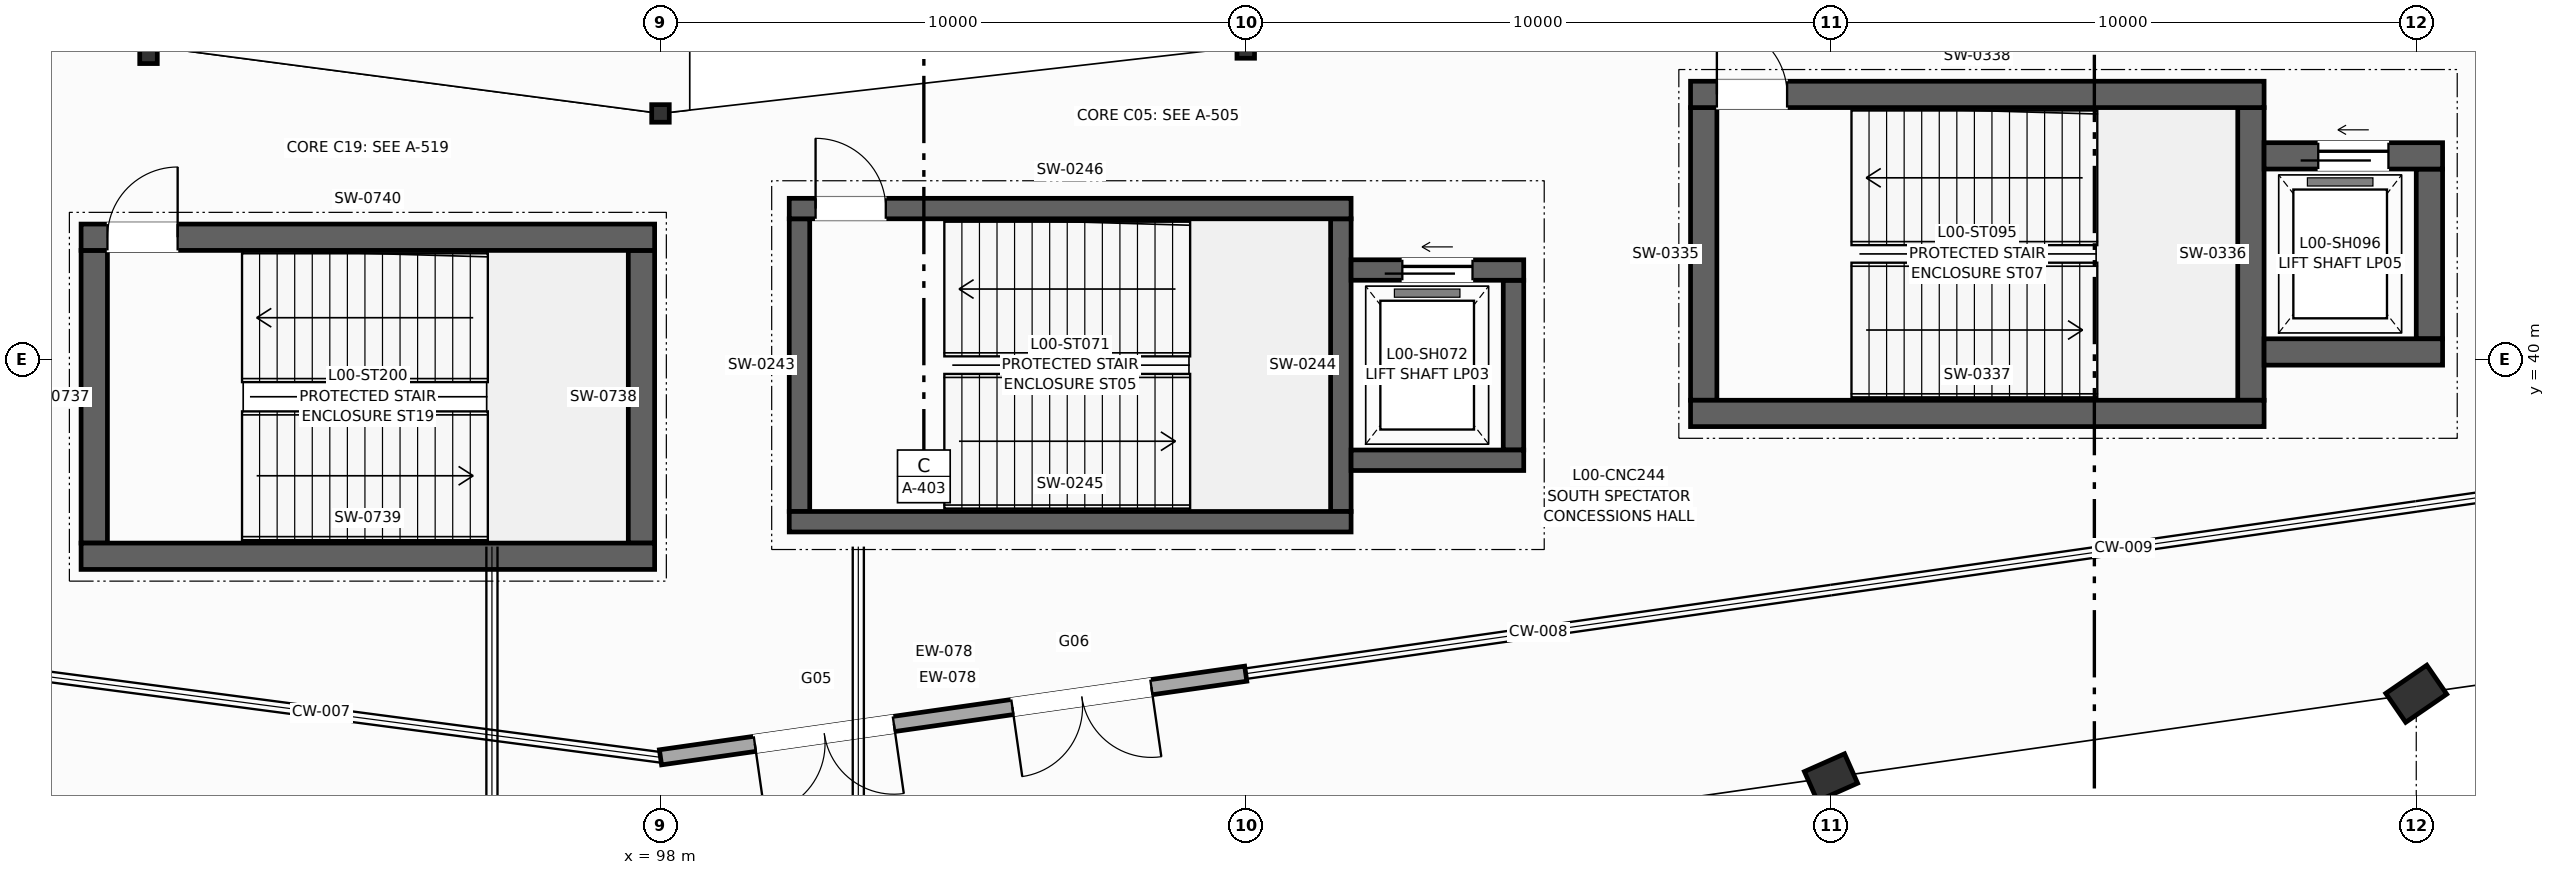
"""IFC4 building model, lengths in metres.
Left out: names, types, materials, properties, quantities, classifications, styles, units other than length and angle.
Written with IfcOpenShell. Run it as: python <this file> out.ifc"""

import sys

from ifc_helpers import new_model, si_unit, direction, frame, frame_2d, origin, origin_2d, place, context, subcontext, project, spatial, rectangle, i_section, extrude, element, fill, save


model = new_model("IFC4")
c1 = context("Model", 3, precision=1e-05, world=origin(), true_north=direction((0.0, 1.0)))
c2 = subcontext(c1, "Body", "Model", "MODEL_VIEW")
j1 = project(units=[si_unit("LENGTHUNIT", "METRE"), si_unit("PLANEANGLEUNIT", "RADIAN")], contexts=[c1])
p1 = place(None, origin())
s1 = spatial("IfcSite", under=j1, at=p1, CompositionType="ELEMENT")
p2 = place(p1, origin())
s2 = spatial("IfcBuilding", under=s1, at=p2, CompositionType="ELEMENT")
p3 = place(p2, origin())
s3 = spatial("IfcBuildingStorey", under=s2, at=p3, CompositionType="ELEMENT", Elevation=0.0)
p4 = place(p3, frame((89.252, 45.352, 0.0), z_axis=(0.0, 0.0, 1.0), x_axis=(1.0, 0.0, 0.0)))
e1 = element("IfcColumn", 1, at=p4, inside=s3, PredefinedType="COLUMN", context=c2, shape_type="SweptSolid", body=[
    extrude(i_section(OverallWidth=0.3, OverallDepth=0.6, WebThickness=0.015, FlangeThickness=0.03, at=origin_2d()), origin(), (0.0, 0.0, 1.0), 4.5),
])
p5 = place(p3, frame((98.0, 44.2, 0.0), z_axis=(0.0, 0.0, 1.0), x_axis=(1.0, 0.0, 0.0)))
e2 = element("IfcColumn", 2, at=p5, inside=s3, PredefinedType="COLUMN", context=c2, shape_type="SweptSolid", body=[
    extrude(i_section(OverallWidth=0.3, OverallDepth=0.3, WebThickness=0.011, FlangeThickness=0.019, at=origin_2d()), origin(), (0.0, 0.0, 1.0), 4.5),
])
p6 = place(p3, frame((108.0, 45.343, 0.0), z_axis=(0.0, 0.0, 1.0), x_axis=(1.0, 0.0, 0.0)))
e3 = element("IfcColumn", 3, at=p6, inside=s3, PredefinedType="COLUMN", context=c2, shape_type="SweptSolid", body=[
    extrude(i_section(OverallWidth=0.3, OverallDepth=0.4, WebThickness=0.013, FlangeThickness=0.024, at=origin_2d()), origin(), (0.0, 0.0, 1.0), 4.5),
])
p7 = place(p3, frame((118.0, 32.857, 0.0), z_axis=(0.0, 0.0, 1.0), x_axis=(-0.40514158678, 0.914253955234, 0.0)))
e4 = element("IfcColumn", 4, at=p7, inside=s3, PredefinedType="PILASTER", context=c2, shape_type="SweptSolid", body=[
    extrude(rectangle(XDim=0.75, YDim=0.55, at=origin_2d()), origin(), (0.0, 0.0, 1.0), 4.5),
])
p8 = place(p3, frame((128.0, 34.286, 0.0), z_axis=(0.0, 0.0, 1.0), x_axis=(-0.566406236925, 0.824126188622, 0.0)))
e5 = element("IfcColumn", 5, at=p8, inside=s3, PredefinedType="PILASTER", context=c2, shape_type="SweptSolid", body=[
    extrude(rectangle(XDim=0.85, YDim=0.6, at=origin_2d()), origin(), (0.0, 0.0, 1.0), 4.5),
])
p9 = place(p3, frame((98.0, 33.2, 0.0), z_axis=(0.0, 0.0, 1.0), x_axis=(0.989944175879, 0.141458575718, 0.0)))
e6 = element("IfcWall", 6, at=p9, inside=s3, PredefinedType="SOLIDWALL", context=c2, shape_type="SweptSolid", body=[
    extrude(rectangle(XDim=10.102, YDim=0.26, at=frame_2d((5.051, 0.0))), origin(), (0.0, 0.0, 1.0), 3.68),
])
p10 = place(p9, frame((1.628, 0.0, 0.0)))
e7 = element("IfcOpeningElement", 7, at=p10, cuts=e6, PredefinedType="OPENING", context=c2, shape_type="SweptSolid", body=[
    extrude(rectangle(XDim=2.4, YDim=2.5, at=frame_2d((1.2, 1.25))), frame((0.0, 0.14, 0.0), z_axis=(0.0, -1.0, 0.0), x_axis=(1.0, 0.0, 0.0)), (0.0, 0.0, 1.0), 0.28),
])
p11 = place(p9, frame((6.073, 0.0, 0.0)))
e8 = element("IfcOpeningElement", 8, at=p11, cuts=e6, PredefinedType="OPENING", context=c2, shape_type="SweptSolid", body=[
    extrude(rectangle(XDim=2.4, YDim=2.5, at=frame_2d((1.2, 1.25))), frame((0.0, 0.14, 0.0), z_axis=(0.0, -1.0, 0.0), x_axis=(1.0, 0.0, 0.0)), (0.0, 0.0, 1.0), 0.28),
])
for number, where, z_axis, x_axis in (
    (9, (100.375, 37.4, 0.0), (0.0, 0.0, 1.0), (0.0, 1.0, 0.0)),
    (10, (109.625, 37.4, 0.0), (0.0, 0.0, 1.0), (0.0, 1.0, 0.0)),
):
    element("IfcWall", number, at=place(p3, frame(where, z_axis=z_axis, x_axis=x_axis)), inside=s3, PredefinedType="SHEAR", context=c2, shape_type="SweptSolid", body=[
        extrude(rectangle(XDim=5.0, YDim=0.35, at=frame_2d((2.5, 0.0))), origin(), (0.0, 0.0, 1.0), 4.225),
    ])
p12 = place(p3, frame((100.2, 37.225, 0.0), z_axis=(0.0, 0.0, 1.0), x_axis=(1.0, 0.0, 0.0)))
e11 = element("IfcWall", 11, at=p12, inside=s3, PredefinedType="SHEAR", context=c2, shape_type="SweptSolid", body=[
    extrude(rectangle(XDim=9.6, YDim=0.35, at=frame_2d((4.8, 0.0))), origin(), (0.0, 0.0, 1.0), 4.225),
])
p13 = place(p3, frame((100.2, 42.575, 0.0), z_axis=(0.0, 0.0, 1.0), x_axis=(1.0, 0.0, 0.0)))
e12 = element("IfcWall", 12, at=p13, inside=s3, PredefinedType="SHEAR", context=c2, shape_type="SweptSolid", body=[
    extrude(rectangle(XDim=9.6, YDim=0.35, at=frame_2d((4.8, 0.0))), origin(), (0.0, 0.0, 1.0), 4.225),
])
p14 = place(p13, frame((0.45, 0.0, 0.0)))
e13 = element("IfcOpeningElement", 13, at=p14, cuts=e12, PredefinedType="OPENING", context=c2, shape_type="SweptSolid", body=[
    extrude(rectangle(XDim=1.2, YDim=2.2, at=frame_2d((0.6, 1.1))), frame((0.0, 0.185, 0.0), z_axis=(0.0, -1.0, 0.0), x_axis=(1.0, 0.0, 0.0)), (0.0, 0.0, 1.0), 0.37),
])
p15 = place(p3, frame((112.575, 38.45, 0.0), z_axis=(0.0, 0.0, 1.0), x_axis=(0.0, 1.0, 0.0)))
e14 = element("IfcWall", 14, at=p15, inside=s3, PredefinedType="SHEAR", context=c2, shape_type="SweptSolid", body=[
    extrude(rectangle(XDim=2.9, YDim=0.35, at=frame_2d((1.45, 0.0))), origin(), (0.0, 0.0, 1.0), 4.225),
])
p16 = place(p3, frame((109.8, 38.275, 0.0), z_axis=(0.0, 0.0, 1.0), x_axis=(1.0, 0.0, 0.0)))
e15 = element("IfcWall", 15, at=p16, inside=s3, PredefinedType="SHEAR", context=c2, shape_type="SweptSolid", body=[
    extrude(rectangle(XDim=2.95, YDim=0.35, at=frame_2d((1.475, 0.0))), origin(), (0.0, 0.0, 1.0), 4.225),
])
p17 = place(p3, frame((109.8, 41.525, 0.0), z_axis=(0.0, 0.0, 1.0), x_axis=(1.0, 0.0, 0.0)))
e16 = element("IfcWall", 16, at=p17, inside=s3, PredefinedType="SHEAR", context=c2, shape_type="SweptSolid", body=[
    extrude(rectangle(XDim=2.95, YDim=0.35, at=frame_2d((1.475, 0.0))), origin(), (0.0, 0.0, 1.0), 4.225),
])
p18 = place(p17, frame((0.875, 0.0, 0.0)))
e17 = element("IfcOpeningElement", 17, at=p18, cuts=e16, PredefinedType="OPENING", context=c2, shape_type="SweptSolid", body=[
    extrude(rectangle(XDim=1.2, YDim=2.2, at=frame_2d((0.6, 1.1))), frame((0.0, 0.185, 0.0), z_axis=(0.0, -1.0, 0.0), x_axis=(1.0, 0.0, 0.0)), (0.0, 0.0, 1.0), 0.37),
])
for number, where, z_axis, x_axis in (
    (18, (115.825, 39.3, 0.0), (0.0, 0.0, 1.0), (0.0, 1.0, 0.0)),
    (19, (125.175, 39.3, 0.0), (0.0, 0.0, 1.0), (0.0, 1.0, 0.0)),
):
    element("IfcWall", number, at=place(p3, frame(where, z_axis=z_axis, x_axis=x_axis)), inside=s3, PredefinedType="SHEAR", context=c2, shape_type="SweptSolid", body=[
        extrude(rectangle(XDim=5.0, YDim=0.45, at=frame_2d((2.5, 0.0))), origin(), (0.0, 0.0, 1.0), 4.225),
    ])
p19 = place(p3, frame((115.6, 39.075, 0.0), z_axis=(0.0, 0.0, 1.0), x_axis=(1.0, 0.0, 0.0)))
e20 = element("IfcWall", 20, at=p19, inside=s3, PredefinedType="SHEAR", context=c2, shape_type="SweptSolid", body=[
    extrude(rectangle(XDim=9.8, YDim=0.45, at=frame_2d((4.9, 0.0))), origin(), (0.0, 0.0, 1.0), 4.225),
])
p20 = place(p3, frame((115.6, 44.525, 0.0), z_axis=(0.0, 0.0, 1.0), x_axis=(1.0, 0.0, 0.0)))
e21 = element("IfcWall", 21, at=p20, inside=s3, PredefinedType="SHEAR", context=c2, shape_type="SweptSolid", body=[
    extrude(rectangle(XDim=9.8, YDim=0.45, at=frame_2d((4.9, 0.0))), origin(), (0.0, 0.0, 1.0), 4.225),
])
p21 = place(p20, frame((0.45, 0.0, 0.0)))
e22 = element("IfcOpeningElement", 22, at=p21, cuts=e21, PredefinedType="OPENING", context=c2, shape_type="SweptSolid", body=[
    extrude(rectangle(XDim=1.2, YDim=2.2, at=frame_2d((0.6, 1.1))), frame((0.0, 0.235, 0.0), z_axis=(0.0, -1.0, 0.0), x_axis=(1.0, 0.0, 0.0)), (0.0, 0.0, 1.0), 0.47),
])
p22 = place(p3, frame((128.225, 40.35, 0.0), z_axis=(0.0, 0.0, 1.0), x_axis=(0.0, 1.0, 0.0)))
e23 = element("IfcWall", 23, at=p22, inside=s3, PredefinedType="SHEAR", context=c2, shape_type="SweptSolid", body=[
    extrude(rectangle(XDim=2.9, YDim=0.45, at=frame_2d((1.45, 0.0))), origin(), (0.0, 0.0, 1.0), 4.225),
])
p23 = place(p3, frame((125.4, 40.125, 0.0), z_axis=(0.0, 0.0, 1.0), x_axis=(1.0, 0.0, 0.0)))
e24 = element("IfcWall", 24, at=p23, inside=s3, PredefinedType="SHEAR", context=c2, shape_type="SweptSolid", body=[
    extrude(rectangle(XDim=3.05, YDim=0.45, at=frame_2d((1.525, 0.0))), origin(), (0.0, 0.0, 1.0), 4.225),
])
p24 = place(p3, frame((125.4, 43.475, 0.0), z_axis=(0.0, 0.0, 1.0), x_axis=(1.0, 0.0, 0.0)))
e25 = element("IfcWall", 25, at=p24, inside=s3, PredefinedType="SHEAR", context=c2, shape_type="SweptSolid", body=[
    extrude(rectangle(XDim=3.05, YDim=0.45, at=frame_2d((1.525, 0.0))), origin(), (0.0, 0.0, 1.0), 4.225),
])
p25 = place(p24, frame((0.925, 0.0, 0.0)))
e26 = element("IfcOpeningElement", 26, at=p25, cuts=e25, PredefinedType="OPENING", context=c2, shape_type="SweptSolid", body=[
    extrude(rectangle(XDim=1.2, YDim=2.2, at=frame_2d((0.6, 1.1))), frame((0.0, 0.235, 0.0), z_axis=(0.0, -1.0, 0.0), x_axis=(1.0, 0.0, 0.0)), (0.0, 0.0, 1.0), 0.47),
])
for number, where, z_axis, x_axis in (
    (27, (88.325, 36.86, 0.0), (0.0, 0.0, 1.0), (0.0, 1.0, 0.0)),
    (28, (97.675, 36.86, 0.0), (0.0, 0.0, 1.0), (0.0, 1.0, 0.0)),
):
    element("IfcWall", number, at=place(p3, frame(where, z_axis=z_axis, x_axis=x_axis)), inside=s3, PredefinedType="SHEAR", context=c2, shape_type="SweptSolid", body=[
        extrude(rectangle(XDim=5.0, YDim=0.45, at=frame_2d((2.5, 0.0))), origin(), (0.0, 0.0, 1.0), 4.225),
    ])
p26 = place(p3, frame((88.1, 36.635, 0.0), z_axis=(0.0, 0.0, 1.0), x_axis=(1.0, 0.0, 0.0)))
e29 = element("IfcWall", 29, at=p26, inside=s3, PredefinedType="SHEAR", context=c2, shape_type="SweptSolid", body=[
    extrude(rectangle(XDim=9.8, YDim=0.45, at=frame_2d((4.9, 0.0))), origin(), (0.0, 0.0, 1.0), 4.225),
])
p27 = place(p3, frame((88.1, 42.085, 0.0), z_axis=(0.0, 0.0, 1.0), x_axis=(1.0, 0.0, 0.0)))
e30 = element("IfcWall", 30, at=p27, inside=s3, PredefinedType="SHEAR", context=c2, shape_type="SweptSolid", body=[
    extrude(rectangle(XDim=9.8, YDim=0.45, at=frame_2d((4.9, 0.0))), origin(), (0.0, 0.0, 1.0), 4.225),
])
p28 = place(p27, frame((0.45, 0.0, 0.0)))
e31 = element("IfcOpeningElement", 31, at=p28, cuts=e30, PredefinedType="OPENING", context=c2, shape_type="SweptSolid", body=[
    extrude(rectangle(XDim=1.2, YDim=2.2, at=frame_2d((0.6, 1.1))), frame((0.0, 0.235, 0.0), z_axis=(0.0, -1.0, 0.0), x_axis=(1.0, 0.0, 0.0)), (0.0, 0.0, 1.0), 0.47),
])
p29 = place(p10, frame((2.4, 0.0, 0.0), z_axis=(0.0, 0.0, 1.0), x_axis=(-1.0, 0.0, 0.0)))
e32 = element("IfcDoor", 32, at=p29, inside=s3, OperationType="DOUBLE_DOOR_SINGLE_SWING", PredefinedType="DOOR", context=c2, shape_type="SweptSolid", body=[
    extrude(rectangle(XDim=2.4, YDim=2.5, at=frame_2d((1.2, 1.25))), frame((0.0, 0.025, 0.0), z_axis=(0.0, -1.0, 0.0), x_axis=(1.0, 0.0, 0.0)), (0.0, 0.0, 1.0), 0.05),
])
fill(e7, e32)
p30 = place(p11, frame((2.4, 0.0, 0.0), z_axis=(0.0, 0.0, 1.0), x_axis=(-1.0, 0.0, 0.0)))
e33 = element("IfcDoor", 33, at=p30, inside=s3, OperationType="DOUBLE_DOOR_SINGLE_SWING", PredefinedType="DOOR", context=c2, shape_type="SweptSolid", body=[
    extrude(rectangle(XDim=2.4, YDim=2.5, at=frame_2d((1.2, 1.25))), frame((0.0, 0.025, 0.0), z_axis=(0.0, -1.0, 0.0), x_axis=(1.0, 0.0, 0.0)), (0.0, 0.0, 1.0), 0.05),
])
fill(e8, e33)
p31 = place(p14, origin())
e34 = element("IfcDoor", 34, at=p31, inside=s3, OperationType="SINGLE_SWING_LEFT", PredefinedType="DOOR", context=c2, shape_type="SweptSolid", body=[
    extrude(rectangle(XDim=1.2, YDim=2.2, at=frame_2d((0.6, 1.1))), frame((0.0, 0.025, 0.0), z_axis=(0.0, -1.0, 0.0), x_axis=(1.0, 0.0, 0.0)), (0.0, 0.0, 1.0), 0.05),
])
fill(e13, e34)
p32 = place(p18, origin())
e35 = element("IfcDoor", 35, at=p32, inside=s3, OperationType="SLIDING_TO_LEFT", PredefinedType="DOOR", context=c2, shape_type="SweptSolid", body=[
    extrude(rectangle(XDim=1.2, YDim=2.2, at=frame_2d((0.6, 1.1))), frame((0.0, 0.025, 0.0), z_axis=(0.0, -1.0, 0.0), x_axis=(1.0, 0.0, 0.0)), (0.0, 0.0, 1.0), 0.05),
])
fill(e17, e35)
p33 = place(p21, origin())
e36 = element("IfcDoor", 36, at=p33, inside=s3, OperationType="SINGLE_SWING_LEFT", PredefinedType="DOOR", context=c2, shape_type="SweptSolid", body=[
    extrude(rectangle(XDim=1.2, YDim=2.2, at=frame_2d((0.6, 1.1))), frame((0.0, 0.025, 0.0), z_axis=(0.0, -1.0, 0.0), x_axis=(1.0, 0.0, 0.0)), (0.0, 0.0, 1.0), 0.05),
])
fill(e22, e36)
p34 = place(p25, origin())
e37 = element("IfcDoor", 37, at=p34, inside=s3, OperationType="SLIDING_TO_LEFT", PredefinedType="DOOR", context=c2, shape_type="SweptSolid", body=[
    extrude(rectangle(XDim=1.2, YDim=2.2, at=frame_2d((0.6, 1.1))), frame((0.0, 0.025, 0.0), z_axis=(0.0, -1.0, 0.0), x_axis=(1.0, 0.0, 0.0)), (0.0, 0.0, 1.0), 0.05),
])
fill(e26, e37)
p35 = place(p28, origin())
e38 = element("IfcDoor", 38, at=p35, inside=s3, OperationType="SINGLE_SWING_RIGHT", PredefinedType="DOOR", context=c2, shape_type="SweptSolid", body=[
    extrude(rectangle(XDim=1.2, YDim=2.2, at=frame_2d((0.6, 1.1))), frame((0.0, 0.025, 0.0), z_axis=(0.0, -1.0, 0.0), x_axis=(1.0, 0.0, 0.0)), (0.0, 0.0, 1.0), 0.05),
])
fill(e31, e38)
save(model, sys.argv[1])
